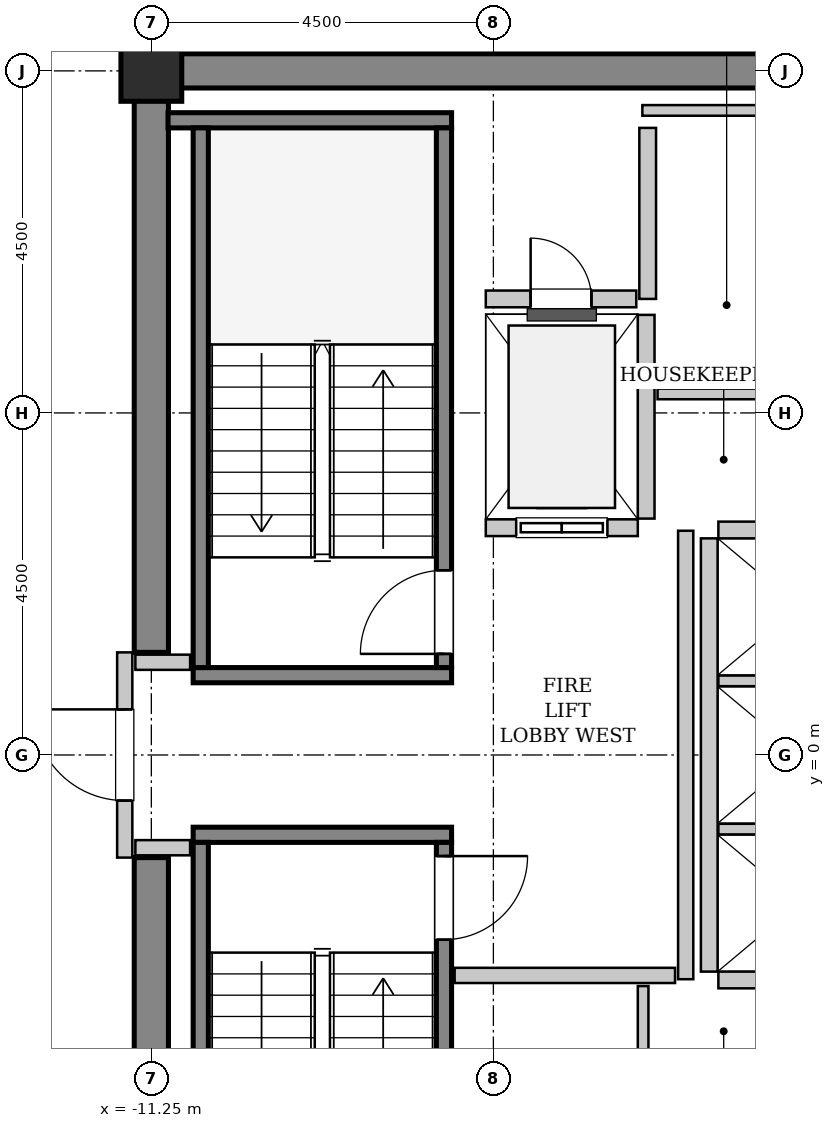
"""IFC4 building model, lengths in metres.
Left out: names, types, materials, properties, quantities, classifications, styles, units other than length and angle.
Written with IfcOpenShell. Run it as: python <this file> out.ifc"""

import sys

from ifc_helpers import new_model, si_unit, direction, frame, frame_2d, origin, origin_2d, place, context, subcontext, project, spatial, rectangle, hollow_rectangle, extrude, source, transform, mapped, element, fill, save


model = new_model("IFC4")
c1 = context("Model", 3, precision=1e-05, world=origin(), true_north=direction((0.0, 1.0)))
c2 = subcontext(c1, "Body", "Model", "MODEL_VIEW")
j1 = project(units=[si_unit("LENGTHUNIT", "METRE"), si_unit("PLANEANGLEUNIT", "RADIAN")], contexts=[c1])
p1 = place(None, origin())
s1 = spatial("IfcSite", under=j1, at=p1, CompositionType="ELEMENT")
p2 = place(p1, origin())
s2 = spatial("IfcBuilding", under=s1, at=p2, CompositionType="ELEMENT")
p3 = place(p2, frame((0.0, 0.0, 221.8)))
s3 = spatial("IfcBuildingStorey", under=s2, at=p3, CompositionType="ELEMENT", Elevation=221.8)
m1 = source(origin(), c2, "Body", "SweptSolid", [
    extrude(rectangle(XDim=9.925, YDim=0.45, at=frame_2d((4.962, 0.0))), origin(), (0.0, 0.0, 1.0), 3.8),
])
p4 = place(p3, frame((-11.475, 9.0, 0.0), z_axis=(0.0, 0.0, 1.0), x_axis=(1.0, 0.0, 0.0)))
e1 = element("IfcWall", 1, at=p4, inside=s3, PredefinedType="SHEAR", context=c2, shape_type="MappedRepresentation", body=[
    mapped(m1, transform((0.0, 0.0, 0.0), x_axis=(1.0, 0.0, 0.0), y_axis=(0.0, 1.0, 0.0), z_axis=(0.0, 0.0, 1.0), scale=1.0)),
])
m2 = source(origin(), c2, "Body", "SweptSolid", [
    extrude(rectangle(XDim=7.425, YDim=0.45, at=frame_2d((3.712, 0.0))), origin(), (0.0, 0.0, 1.0), 3.8),
])
for number, where, z_axis, x_axis in (
    (2, (-11.25, -8.775, 0.0), (0.0, 0.0, 1.0), (0.0, 1.0, 0.0)),
    (3, (-11.25, 1.35, 0.0), (0.0, 0.0, 1.0), (0.0, 1.0, 0.0)),
):
    element("IfcWall", number, at=place(p3, frame(where, z_axis=z_axis, x_axis=x_axis)), inside=s3, PredefinedType="SHEAR", context=c2, shape_type="MappedRepresentation", body=[
        mapped(m2, transform((0.0, 0.0, 0.0), x_axis=(1.0, 0.0, 0.0), y_axis=(0.0, 1.0, 0.0), z_axis=(0.0, 0.0, 1.0), scale=1.0)),
    ])
m3 = source(origin(), c2, "Body", "SweptSolid", [
    extrude(hollow_rectangle(XDim=0.8, YDim=0.8, WallThickness=0.04, InnerFilletRadius=0.04, OuterFilletRadius=0.08, at=origin_2d()), origin(), (0.0, 0.0, 1.0), 3.8),
])
p5 = place(p3, frame((-11.25, 9.0, 0.0), z_axis=(0.0, 0.0, 1.0), x_axis=(1.0, 0.0, 0.0)))
e4 = element("IfcColumn", 4, at=p5, inside=s3, PredefinedType="COLUMN", context=c2, shape_type="MappedRepresentation", body=[
    mapped(m3, transform((0.0, 0.0, 0.0), x_axis=(1.0, 0.0, 0.0), y_axis=(0.0, 1.0, 0.0), z_axis=(0.0, 0.0, 1.0), scale=1.0)),
])
m4 = source(origin(), c2, "Body", "SweptSolid", [
    extrude(rectangle(XDim=3.4, YDim=0.2, at=frame_2d((1.7, 0.0))), origin(), (0.0, 0.0, 1.0), 3.8),
])
p6 = place(p3, frame((-7.3, 1.05, 0.0), z_axis=(0.0, 0.0, 1.0), x_axis=(-1.0, 0.0, 0.0)))
e5 = element("IfcWall", 5, at=p6, inside=s3, PredefinedType="SOLIDWALL", context=c2, shape_type="MappedRepresentation", body=[
    mapped(m4, transform((0.0, 0.0, 0.0), x_axis=(1.0, 0.0, 0.0), y_axis=(0.0, 1.0, 0.0), z_axis=(0.0, 0.0, 1.0), scale=1.0)),
])
m5 = source(origin(), c2, "Body", "SweptSolid", [
    extrude(rectangle(XDim=3.73, YDim=0.2, at=frame_2d((1.865, 0.0))), origin(), (0.0, 0.0, 1.0), 3.8),
])
p7 = place(p3, frame((-7.3, 8.35, 0.0), z_axis=(0.0, 0.0, 1.0), x_axis=(-1.0, 0.0, 0.0)))
e6 = element("IfcWall", 6, at=p7, inside=s3, PredefinedType="SOLIDWALL", context=c2, shape_type="MappedRepresentation", body=[
    mapped(m5, transform((0.0, 0.0, 0.0), x_axis=(1.0, 0.0, 0.0), y_axis=(0.0, 1.0, 0.0), z_axis=(0.0, 0.0, 1.0), scale=1.0)),
])
m6 = source(origin(), c2, "Body", "SweptSolid", [
    extrude(rectangle(XDim=7.1, YDim=0.2, at=frame_2d((3.55, 0.0))), origin(), (0.0, 0.0, 1.0), 3.8),
])
p8 = place(p3, frame((-7.4, 1.15, 0.0), z_axis=(0.0, 0.0, 1.0), x_axis=(0.0, 1.0, 0.0)))
e7 = element("IfcWall", 7, at=p8, inside=s3, PredefinedType="SOLIDWALL", context=c2, shape_type="MappedRepresentation", body=[
    mapped(m6, transform((0.0, 0.0, 0.0), x_axis=(1.0, 0.0, 0.0), y_axis=(0.0, 1.0, 0.0), z_axis=(0.0, 0.0, 1.0), scale=1.0)),
])
p9 = place(p8, frame((0.18, 0.0, 0.0)))
e8 = element("IfcOpeningElement", 8, at=p9, cuts=e7, PredefinedType="OPENING", context=c2, shape_type="SweptSolid", body=[
    extrude(rectangle(XDim=1.1, YDim=2.15, at=frame_2d((0.55, 1.075))), frame((0.0, 0.11, 0.0), z_axis=(0.0, -1.0, 0.0), x_axis=(1.0, 0.0, 0.0)), (0.0, 0.0, 1.0), 0.22),
])
p10 = place(p3, frame((-10.6, 1.15, 0.0), z_axis=(0.0, 0.0, 1.0), x_axis=(0.0, 1.0, 0.0)))
e9 = element("IfcWall", 9, at=p10, inside=s3, PredefinedType="SOLIDWALL", context=c2, shape_type="MappedRepresentation", body=[
    mapped(m6, transform((0.0, 0.0, 0.0), x_axis=(1.0, 0.0, 0.0), y_axis=(0.0, 1.0, 0.0), z_axis=(0.0, 0.0, 1.0), scale=1.0)),
])
p11 = place(p3, frame((-10.7, -1.05, 0.0), z_axis=(0.0, 0.0, 1.0), x_axis=(1.0, 0.0, 0.0)))
e10 = element("IfcWall", 10, at=p11, inside=s3, PredefinedType="SOLIDWALL", context=c2, shape_type="MappedRepresentation", body=[
    mapped(m4, transform((0.0, 0.0, 0.0), x_axis=(1.0, 0.0, 0.0), y_axis=(0.0, 1.0, 0.0), z_axis=(0.0, 0.0, 1.0), scale=1.0)),
])
p12 = place(p3, frame((-10.6, -1.15, 0.0), z_axis=(0.0, 0.0, 1.0), x_axis=(0.0, -1.0, 0.0)))
e11 = element("IfcWall", 11, at=p12, inside=s3, PredefinedType="SOLIDWALL", context=c2, shape_type="MappedRepresentation", body=[
    mapped(m6, transform((0.0, 0.0, 0.0), x_axis=(1.0, 0.0, 0.0), y_axis=(0.0, 1.0, 0.0), z_axis=(0.0, 0.0, 1.0), scale=1.0)),
])
p13 = place(p3, frame((-7.4, -1.15, 0.0), z_axis=(0.0, 0.0, 1.0), x_axis=(0.0, -1.0, 0.0)))
e12 = element("IfcWall", 12, at=p13, inside=s3, PredefinedType="SOLIDWALL", context=c2, shape_type="MappedRepresentation", body=[
    mapped(m6, transform((0.0, 0.0, 0.0), x_axis=(1.0, 0.0, 0.0), y_axis=(0.0, 1.0, 0.0), z_axis=(0.0, 0.0, 1.0), scale=1.0)),
])
p14 = place(p13, frame((0.18, 0.0, 0.0)))
e13 = element("IfcOpeningElement", 13, at=p14, cuts=e12, PredefinedType="OPENING", context=c2, shape_type="SweptSolid", body=[
    extrude(rectangle(XDim=1.1, YDim=2.15, at=frame_2d((0.55, 1.075))), frame((0.0, 0.11, 0.0), z_axis=(0.0, -1.0, 0.0), x_axis=(1.0, 0.0, 0.0)), (0.0, 0.0, 1.0), 0.22),
])
m7 = source(origin(), c2, "Body", "SweptSolid", [
    extrude(rectangle(XDim=2.0, YDim=0.22, at=frame_2d((1.0, 0.0))), origin(), (0.0, 0.0, 1.0), 3.535),
])
p15 = place(p3, frame((-6.85, 2.99, 0.0), z_axis=(0.0, 0.0, 1.0), x_axis=(1.0, 0.0, 0.0)))
e14 = element("IfcWall", 14, at=p15, inside=s3, PredefinedType="SOLIDWALL", context=c2, shape_type="MappedRepresentation", body=[
    mapped(m7, transform((0.0, 0.0, 0.0), x_axis=(1.0, 0.0, 0.0), y_axis=(0.0, 1.0, 0.0), z_axis=(0.0, 0.0, 1.0), scale=1.0)),
])
p16 = place(p15, frame((0.4, 0.0, 0.0)))
e15 = element("IfcOpeningElement", 15, at=p16, cuts=e14, PredefinedType="OPENING", context=c2, shape_type="SweptSolid", body=[
    extrude(rectangle(XDim=1.2, YDim=2.2, at=frame_2d((0.6, 1.1))), frame((0.0, 0.12, 0.0), z_axis=(0.0, -1.0, 0.0), x_axis=(1.0, 0.0, 0.0)), (0.0, 0.0, 1.0), 0.24),
])
m8 = source(origin(), c2, "Body", "SweptSolid", [
    extrude(rectangle(XDim=2.68, YDim=0.22, at=frame_2d((1.34, 0.0))), origin(), (0.0, 0.0, 1.0), 3.535),
])
p17 = place(p3, frame((-4.74, 3.11, 0.0), z_axis=(0.0, 0.0, 1.0), x_axis=(0.0, 1.0, 0.0)))
e16 = element("IfcWall", 16, at=p17, inside=s3, PredefinedType="SOLIDWALL", context=c2, shape_type="MappedRepresentation", body=[
    mapped(m8, transform((0.0, 0.0, 0.0), x_axis=(1.0, 0.0, 0.0), y_axis=(0.0, 1.0, 0.0), z_axis=(0.0, 0.0, 1.0), scale=1.0)),
])
m9 = source(origin(), c2, "Body", "SweptSolid", [
    extrude(rectangle(XDim=5.7, YDim=0.22, at=frame_2d((2.85, 0.0))), origin(), (0.0, 0.0, 1.0), 3.535),
])
p18 = place(p3, frame((-3.91, 2.85, 0.0), z_axis=(0.0, 0.0, 1.0), x_axis=(0.0, -1.0, 0.0)))
e17 = element("IfcWall", 17, at=p18, inside=s3, PredefinedType="SOLIDWALL", context=c2, shape_type="MappedRepresentation", body=[
    mapped(m9, transform((0.0, 0.0, 0.0), x_axis=(1.0, 0.0, 0.0), y_axis=(0.0, 1.0, 0.0), z_axis=(0.0, 0.0, 1.0), scale=1.0)),
])
m10 = source(origin(), c2, "Body", "SweptSolid", [
    extrude(rectangle(XDim=2.13, YDim=0.22, at=frame_2d((1.065, 0.0))), origin(), (0.0, 0.0, 1.0), 3.535),
])
p19 = place(p3, frame((-3.79, -2.96, 0.0), z_axis=(0.0, 0.0, 1.0), x_axis=(1.0, 0.0, 0.0)))
e18 = element("IfcWall", 18, at=p19, inside=s3, PredefinedType="SOLIDWALL", context=c2, shape_type="MappedRepresentation", body=[
    mapped(m10, transform((0.0, 0.0, 0.0), x_axis=(1.0, 0.0, 0.0), y_axis=(0.0, 1.0, 0.0), z_axis=(0.0, 0.0, 1.0), scale=1.0)),
])
m11 = source(origin(), c2, "Body", "SweptSolid", [
    extrude(rectangle(XDim=2.13, YDim=0.14, at=frame_2d((1.065, 0.0))), origin(), (0.0, 0.0, 1.0), 3.535),
])
for number, where, z_axis, x_axis in (
    (19, (-3.79, -0.975, 0.0), (0.0, 0.0, 1.0), (1.0, 0.0, 0.0)),
    (20, (-3.79, 0.975, 0.0), (0.0, 0.0, 1.0), (1.0, 0.0, 0.0)),
):
    element("IfcWall", number, at=place(p3, frame(where, z_axis=z_axis, x_axis=x_axis)), inside=s3, PredefinedType="PARTITIONING", context=c2, shape_type="MappedRepresentation", body=[
        mapped(m11, transform((0.0, 0.0, 0.0), x_axis=(1.0, 0.0, 0.0), y_axis=(0.0, 1.0, 0.0), z_axis=(0.0, 0.0, 1.0), scale=1.0)),
    ])
p20 = place(p3, frame((-1.66, 2.96, 0.0), z_axis=(0.0, 0.0, 1.0), x_axis=(-1.0, 0.0, 0.0)))
e21 = element("IfcWall", 21, at=p20, inside=s3, PredefinedType="SOLIDWALL", context=c2, shape_type="MappedRepresentation", body=[
    mapped(m10, transform((0.0, 0.0, 0.0), x_axis=(1.0, 0.0, 0.0), y_axis=(0.0, 1.0, 0.0), z_axis=(0.0, 0.0, 1.0), scale=1.0)),
])
m12 = source(origin(), c2, "Body", "SweptSolid", [
    extrude(rectangle(XDim=2.25, YDim=0.22, at=frame_2d((1.125, 0.0))), origin(), (0.0, 0.0, 1.0), 3.535),
])
p21 = place(p3, frame((-4.72, 6.0, 0.0), z_axis=(0.0, 0.0, 1.0), x_axis=(0.0, 1.0, 0.0)))
e22 = element("IfcWall", 22, at=p21, inside=s3, PredefinedType="SOLIDWALL", context=c2, shape_type="MappedRepresentation", body=[
    mapped(m12, transform((0.0, 0.0, 0.0), x_axis=(1.0, 0.0, 0.0), y_axis=(0.0, 1.0, 0.0), z_axis=(0.0, 0.0, 1.0), scale=1.0)),
])
m13 = source(origin(), c2, "Body", "SweptSolid", [
    extrude(rectangle(XDim=1.98, YDim=0.22, at=frame_2d((0.99, 0.0))), origin(), (0.0, 0.0, 1.0), 3.535),
])
p22 = place(p3, frame((-6.85, 6.0, 0.0), z_axis=(0.0, 0.0, 1.0), x_axis=(1.0, 0.0, 0.0)))
e23 = element("IfcWall", 23, at=p22, inside=s3, PredefinedType="SOLIDWALL", context=c2, shape_type="MappedRepresentation", body=[
    mapped(m13, transform((0.0, 0.0, 0.0), x_axis=(1.0, 0.0, 0.0), y_axis=(0.0, 1.0, 0.0), z_axis=(0.0, 0.0, 1.0), scale=1.0)),
])
p23 = place(p22, frame((0.59, 0.0, 0.0)))
e24 = element("IfcOpeningElement", 24, at=p23, cuts=e23, PredefinedType="OPENING", context=c2, shape_type="SweptSolid", body=[
    extrude(rectangle(XDim=0.8, YDim=2.0, at=frame_2d((0.4, 1.0))), frame((0.0, 0.12, 0.0), z_axis=(0.0, -1.0, 0.0), x_axis=(1.0, 0.0, 0.0)), (0.0, 0.0, 1.0), 0.24),
])
m14 = source(origin(), c2, "Body", "SweptSolid", [
    extrude(rectangle(XDim=2.7, YDim=0.2, at=frame_2d((1.35, 0.0))), origin(), (0.0, 0.0, 1.0), 2.625),
])
p24 = place(p3, frame((-11.6, -1.35, 0.0), z_axis=(0.0, 0.0, 1.0), x_axis=(0.0, 1.0, 0.0)))
e25 = element("IfcWall", 25, at=p24, inside=s3, PredefinedType="PARTITIONING", context=c2, shape_type="MappedRepresentation", body=[
    mapped(m14, transform((0.0, 0.0, 0.0), x_axis=(1.0, 0.0, 0.0), y_axis=(0.0, 1.0, 0.0), z_axis=(0.0, 0.0, 1.0), scale=1.0)),
])
p25 = place(p24, frame((0.75, 0.0, 0.0)))
e26 = element("IfcOpeningElement", 26, at=p25, cuts=e25, PredefinedType="OPENING", context=c2, shape_type="SweptSolid", body=[
    extrude(rectangle(XDim=1.2, YDim=2.15, at=frame_2d((0.6, 1.075))), frame((0.0, 0.11, 0.0), z_axis=(0.0, -1.0, 0.0), x_axis=(1.0, 0.0, 0.0)), (0.0, 0.0, 1.0), 0.22),
])
m15 = source(origin(), c2, "Body", "SweptSolid", [
    extrude(rectangle(XDim=5.9, YDim=0.2, at=frame_2d((2.95, 0.0))), origin(), (0.0, 0.0, 1.0), 3.535),
])
p26 = place(p3, frame((-4.22, -2.95, 0.0), z_axis=(0.0, 0.0, 1.0), x_axis=(0.0, 1.0, 0.0)))
e27 = element("IfcWall", 27, at=p26, inside=s3, PredefinedType="PARTITIONING", context=c2, shape_type="MappedRepresentation", body=[
    mapped(m15, transform((0.0, 0.0, 0.0), x_axis=(1.0, 0.0, 0.0), y_axis=(0.0, 1.0, 0.0), z_axis=(0.0, 0.0, 1.0), scale=1.0)),
])
m16 = source(origin(), c2, "Body", "SweptSolid", [
    extrude(rectangle(XDim=2.9, YDim=0.2, at=frame_2d((1.45, 0.0))), origin(), (0.0, 0.0, 1.0), 3.535),
])
p27 = place(p3, frame((-7.26, -2.9, 0.0), z_axis=(0.0, 0.0, 1.0), x_axis=(1.0, 0.0, 0.0)))
e28 = element("IfcWall", 28, at=p27, inside=s3, PredefinedType="PARTITIONING", context=c2, shape_type="MappedRepresentation", body=[
    mapped(m16, transform((0.0, 0.0, 0.0), x_axis=(1.0, 0.0, 0.0), y_axis=(0.0, 1.0, 0.0), z_axis=(0.0, 0.0, 1.0), scale=1.0)),
])
m17 = source(origin(), c2, "Body", "SweptSolid", [
    extrude(rectangle(XDim=0.72, YDim=0.2, at=frame_2d((0.36, 0.0))), origin(), (0.0, 0.0, 1.0), 3.535),
])
for number, where, z_axis, x_axis in (
    (29, (-11.46, 1.22, 0.0), (0.0, 0.0, 1.0), (1.0, 0.0, 0.0)),
    (30, (-11.46, -1.22, 0.0), (0.0, 0.0, 1.0), (1.0, 0.0, 0.0)),
):
    element("IfcWall", number, at=place(p3, frame(where, z_axis=z_axis, x_axis=x_axis)), inside=s3, PredefinedType="PARTITIONING", context=c2, shape_type="MappedRepresentation", body=[
        mapped(m17, transform((0.0, 0.0, 0.0), x_axis=(1.0, 0.0, 0.0), y_axis=(0.0, 1.0, 0.0), z_axis=(0.0, 0.0, 1.0), scale=1.0)),
    ])
m18 = source(origin(), c2, "Body", "SweptSolid", [
    extrude(rectangle(XDim=2.95, YDim=0.14, at=frame_2d((1.475, 0.0))), origin(), (0.0, 0.0, 1.0), 3.535),
])
p28 = place(p3, frame((-4.59, 4.75, 0.0), z_axis=(0.0, 0.0, 1.0), x_axis=(1.0, 0.0, 0.0)))
e31 = element("IfcWall", 31, at=p28, inside=s3, PredefinedType="PARTITIONING", context=c2, shape_type="MappedRepresentation", body=[
    mapped(m18, transform((0.0, 0.0, 0.0), x_axis=(1.0, 0.0, 0.0), y_axis=(0.0, 1.0, 0.0), z_axis=(0.0, 0.0, 1.0), scale=1.0)),
])
m19 = source(origin(), c2, "Body", "SweptSolid", [
    extrude(rectangle(XDim=3.15, YDim=0.14, at=frame_2d((1.575, 0.0))), origin(), (0.0, 0.0, 1.0), 3.535),
])
p29 = place(p3, frame((-4.79, 8.48, 0.0), z_axis=(0.0, 0.0, 1.0), x_axis=(1.0, 0.0, 0.0)))
e32 = element("IfcWall", 32, at=p29, inside=s3, PredefinedType="PARTITIONING", context=c2, shape_type="MappedRepresentation", body=[
    mapped(m19, transform((0.0, 0.0, 0.0), x_axis=(1.0, 0.0, 0.0), y_axis=(0.0, 1.0, 0.0), z_axis=(0.0, 0.0, 1.0), scale=1.0)),
])
m20 = source(origin(), c2, "Body", "SweptSolid", [
    extrude(rectangle(XDim=1.1, YDim=0.14, at=frame_2d((0.55, 0.0))), origin(), (0.0, 0.0, 1.0), 3.535),
])
p30 = place(p3, frame((-4.78, -4.14, 0.0), z_axis=(0.0, 0.0, 1.0), x_axis=(0.0, 1.0, 0.0)))
e33 = element("IfcWall", 33, at=p30, inside=s3, PredefinedType="PARTITIONING", context=c2, shape_type="MappedRepresentation", body=[
    mapped(m20, transform((0.0, 0.0, 0.0), x_axis=(1.0, 0.0, 0.0), y_axis=(0.0, 1.0, 0.0), z_axis=(0.0, 0.0, 1.0), scale=1.0)),
])
m21 = source(origin(), c2, "Body", "SweptSolid", [
    extrude(rectangle(XDim=1.1, YDim=2.15, at=frame_2d((0.55, 1.075))), frame((0.0, 0.025, 0.0), z_axis=(0.0, -1.0, 0.0), x_axis=(1.0, 0.0, 0.0)), (0.0, 0.0, 1.0), 0.05),
])
p31 = place(p9, origin())
e34 = element("IfcDoor", 34, at=p31, inside=s3, OperationType="SINGLE_SWING_LEFT", PredefinedType="DOOR", context=c2, shape_type="MappedRepresentation", body=[
    mapped(m21, transform((0.0, 0.0, 0.0), x_axis=(1.0, 0.0, 0.0), y_axis=(0.0, 1.0, 0.0), z_axis=(0.0, 0.0, 1.0), scale=1.0)),
])
fill(e8, e34)
p32 = place(p14, origin())
e35 = element("IfcDoor", 35, at=p32, inside=s3, OperationType="SINGLE_SWING_LEFT", PredefinedType="DOOR", context=c2, shape_type="MappedRepresentation", body=[
    mapped(m21, transform((0.0, 0.0, 0.0), x_axis=(1.0, 0.0, 0.0), y_axis=(0.0, 1.0, 0.0), z_axis=(0.0, 0.0, 1.0), scale=1.0)),
])
fill(e13, e35)
m22 = source(origin(), c2, "Body", "SweptSolid", [
    extrude(rectangle(XDim=1.2, YDim=2.2, at=frame_2d((0.6, 1.1))), frame((0.0, 0.025, 0.0), z_axis=(0.0, -1.0, 0.0), x_axis=(1.0, 0.0, 0.0)), (0.0, 0.0, 1.0), 0.05),
])
p33 = place(p16, origin())
e36 = element("IfcDoor", 36, at=p33, inside=s3, OperationType="SLIDING_TO_LEFT", PredefinedType="DOOR", context=c2, shape_type="MappedRepresentation", body=[
    mapped(m22, transform((0.0, 0.0, 0.0), x_axis=(1.0, 0.0, 0.0), y_axis=(0.0, 1.0, 0.0), z_axis=(0.0, 0.0, 1.0), scale=1.0)),
])
fill(e15, e36)
m23 = source(origin(), c2, "Body", "SweptSolid", [
    extrude(rectangle(XDim=0.8, YDim=2.0, at=frame_2d((0.4, 1.0))), frame((0.0, 0.025, 0.0), z_axis=(0.0, -1.0, 0.0), x_axis=(1.0, 0.0, 0.0)), (0.0, 0.0, 1.0), 0.05),
])
p34 = place(p23, origin())
e37 = element("IfcDoor", 37, at=p34, inside=s3, OperationType="SINGLE_SWING_LEFT", PredefinedType="TRAPDOOR", context=c2, shape_type="MappedRepresentation", body=[
    mapped(m23, transform((0.0, 0.0, 0.0), x_axis=(1.0, 0.0, 0.0), y_axis=(0.0, 1.0, 0.0), z_axis=(0.0, 0.0, 1.0), scale=1.0)),
])
fill(e24, e37)
m24 = source(origin(), c2, "Body", "SweptSolid", [
    extrude(rectangle(XDim=1.2, YDim=2.15, at=frame_2d((0.6, 1.075))), frame((0.0, 0.025, 0.0), z_axis=(0.0, -1.0, 0.0), x_axis=(1.0, 0.0, 0.0)), (0.0, 0.0, 1.0), 0.05),
])
p35 = place(p25, origin())
e38 = element("IfcDoor", 38, at=p35, inside=s3, OperationType="SINGLE_SWING_RIGHT", PredefinedType="DOOR", context=c2, shape_type="MappedRepresentation", body=[
    mapped(m24, transform((0.0, 0.0, 0.0), x_axis=(1.0, 0.0, 0.0), y_axis=(0.0, 1.0, 0.0), z_axis=(0.0, 0.0, 1.0), scale=1.0)),
])
fill(e26, e38)
save(model, sys.argv[1])
